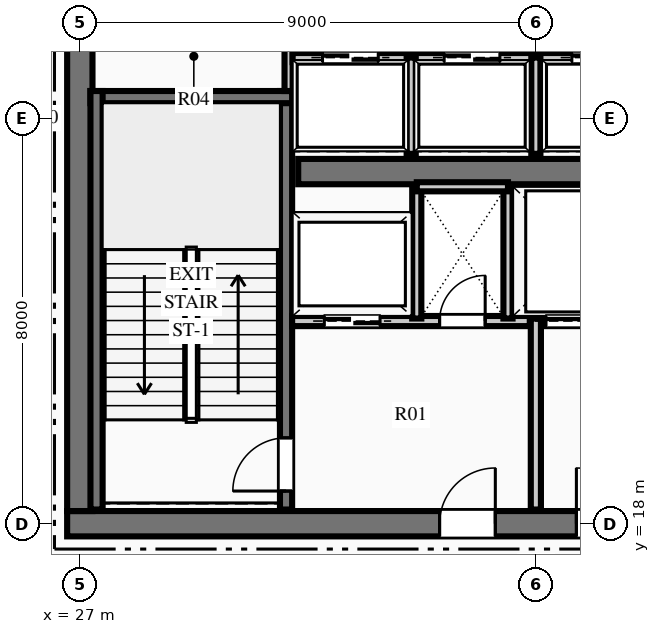
"""IFC4 building model, lengths in metres.
Left out: names, types, materials, properties, quantities, classifications, styles, units other than length and angle.
Written with IfcOpenShell. Run it as: python <this file> out.ifc"""

import sys

from ifc_helpers import new_model, si_unit, direction, frame, frame_2d, origin, place, context, subcontext, project, spatial, rectangle, extrude, element, fill, save


model = new_model("IFC4")
c1 = context("Model", 3, precision=1e-05, world=origin(), true_north=direction((0.0, 1.0)))
c2 = subcontext(c1, "Body", "Model", "MODEL_VIEW")
j1 = project(units=[si_unit("LENGTHUNIT", "METRE"), si_unit("PLANEANGLEUNIT", "RADIAN")], contexts=[c1])
p1 = place(None, origin())
s1 = spatial("IfcSite", under=j1, at=p1, CompositionType="ELEMENT")
p2 = place(p1, origin())
s2 = spatial("IfcBuilding", under=s1, at=p2, CompositionType="ELEMENT")
p3 = place(p2, frame((0.0, 0.0, 239.7)))
s3 = spatial("IfcBuildingStorey", under=s2, at=p3, CompositionType="ELEMENT", Elevation=239.7)
p4 = place(p3, frame((26.75, 18.0, 0.0), z_axis=(0.0, 0.0, 1.0), x_axis=(1.0, 0.0, 0.0)))
e1 = element("IfcWall", 1, at=p4, inside=s3, PredefinedType="SHEAR", context=c2, shape_type="SweptSolid", body=[
    extrude(rectangle(XDim=18.5, YDim=0.5, at=frame_2d((9.25, 0.0))), origin(), (0.0, 0.0, 1.0), 4.5),
])
p5 = place(p4, frame((7.35, 0.0, 0.0)))
e2 = element("IfcOpeningElement", 2, at=p5, cuts=e1, PredefinedType="OPENING", context=c2, shape_type="SweptSolid", body=[
    extrude(rectangle(XDim=1.1, YDim=2.15, at=frame_2d((0.55, 1.075))), frame((0.0, 0.26, 0.0), z_axis=(0.0, -1.0, 0.0), x_axis=(1.0, 0.0, 0.0)), (0.0, 0.0, 1.0), 0.52),
])
p6 = place(p4, frame((10.05, 0.0, 0.0)))
e3 = element("IfcOpeningElement", 3, at=p6, cuts=e1, PredefinedType="OPENING", context=c2, shape_type="SweptSolid", body=[
    extrude(rectangle(XDim=1.1, YDim=2.15, at=frame_2d((0.55, 1.075))), frame((0.0, 0.26, 0.0), z_axis=(0.0, -1.0, 0.0), x_axis=(1.0, 0.0, 0.0)), (0.0, 0.0, 1.0), 0.52),
])
p7 = place(p3, frame((27.0, 18.25, 0.0), z_axis=(0.0, 0.0, 1.0), x_axis=(0.0, 1.0, 0.0)))
e4 = element("IfcWall", 4, at=p7, inside=s3, PredefinedType="SHEAR", context=c2, shape_type="SweptSolid", body=[
    extrude(rectangle(XDim=15.5, YDim=0.5, at=frame_2d((7.75, 0.0))), origin(), (0.0, 0.0, 1.0), 4.5),
])
p8 = place(p7, frame((9.99, 0.0, 0.0)))
e5 = element("IfcOpeningElement", 5, at=p8, cuts=e4, PredefinedType="OPENING", context=c2, shape_type="SweptSolid", body=[
    extrude(rectangle(XDim=1.4, YDim=2.2, at=frame_2d((0.7, 1.1))), frame((0.0, 0.26, 0.0), z_axis=(0.0, -1.0, 0.0), x_axis=(1.0, 0.0, 0.0)), (0.0, 0.0, 1.0), 0.52),
])
p9 = place(p3, frame((31.31, 24.95, 0.0), z_axis=(0.0, 0.0, 1.0), x_axis=(1.0, 0.0, 0.0)))
e6 = element("IfcWall", 6, at=p9, inside=s3, PredefinedType="SHEAR", context=c2, shape_type="SweptSolid", body=[
    extrude(rectangle(XDim=9.38, YDim=0.5, at=frame_2d((4.69, 0.0))), origin(), (0.0, 0.0, 1.0), 4.5),
])
p10 = place(p3, frame((31.07, 18.28, 0.0), z_axis=(0.0, 0.0, 1.0), x_axis=(0.0, 1.0, 0.0)))
e7 = element("IfcWall", 7, at=p10, inside=s3, PredefinedType="SHEAR", context=c2, shape_type="SweptSolid", body=[
    extrude(rectangle(XDim=8.26, YDim=0.24, at=frame_2d((4.13, 0.0))), origin(), (0.0, 0.0, 1.0), 4.5),
])
p11 = place(p10, frame((0.365, 0.0, 0.0)))
e8 = element("IfcOpeningElement", 8, at=p11, cuts=e7, PredefinedType="OPENING", context=c2, shape_type="SweptSolid", body=[
    extrude(rectangle(XDim=1.05, YDim=2.15, at=frame_2d((0.525, 1.075))), frame((0.0, 0.13, 0.0), z_axis=(0.0, -1.0, 0.0), x_axis=(1.0, 0.0, 0.0)), (0.0, 0.0, 1.0), 0.26),
])
p12 = place(p3, frame((27.21, 26.42, 0.0), z_axis=(0.0, 0.0, 1.0), x_axis=(1.0, 0.0, 0.0)))
e9 = element("IfcWall", 9, at=p12, inside=s3, PredefinedType="SHEAR", context=c2, shape_type="SweptSolid", body=[
    extrude(rectangle(XDim=3.98, YDim=0.24, at=frame_2d((1.99, 0.0))), origin(), (0.0, 0.0, 1.0), 4.5),
])
p13 = place(p3, frame((27.33, 18.28, 0.0), z_axis=(0.0, 0.0, 1.0), x_axis=(0.0, 1.0, 0.0)))
e10 = element("IfcWall", 10, at=p13, inside=s3, PredefinedType="SHEAR", context=c2, shape_type="SweptSolid", body=[
    extrude(rectangle(XDim=8.26, YDim=0.24, at=frame_2d((4.13, 0.0))), origin(), (0.0, 0.0, 1.0), 4.5),
])
p14 = place(p3, frame((36.0, 18.28, 0.0), z_axis=(0.0, 0.0, 1.0), x_axis=(0.0, 1.0, 0.0)))
e11 = element("IfcWall", 11, at=p14, inside=s3, PredefinedType="PARTITIONING", context=c2, shape_type="SweptSolid", body=[
    extrude(rectangle(XDim=3.77, YDim=0.2, at=frame_2d((1.885, 0.0))), origin(), (0.0, 0.0, 1.0), 4.1),
])
p15 = place(p3, frame((31.19, 22.0, 0.0), z_axis=(0.0, 0.0, 1.0), x_axis=(1.0, 0.0, 0.0)))
e12 = element("IfcWall", 12, at=p15, inside=s3, PredefinedType="PARTITIONING", context=c2, shape_type="SweptSolid", body=[
    extrude(rectangle(XDim=4.69, YDim=0.2, at=frame_2d((2.345, 0.0))), origin(), (0.0, 0.0, 1.0), 4.1),
])
p16 = place(p15, frame((2.91, 0.0, 0.0)))
e13 = element("IfcOpeningElement", 13, at=p16, cuts=e12, PredefinedType="OPENING", context=c2, shape_type="SweptSolid", body=[
    extrude(rectangle(XDim=0.9, YDim=2.15, at=frame_2d((0.45, 1.075))), frame((0.0, 0.11, 0.0), z_axis=(0.0, -1.0, 0.0), x_axis=(1.0, 0.0, 0.0)), (0.0, 0.0, 1.0), 0.22),
])
p17 = place(p15, frame((0.635, 0.0, 0.0)))
e14 = element("IfcOpeningElement", 14, at=p17, cuts=e12, PredefinedType="OPENING", context=c2, shape_type="SweptSolid", body=[
    extrude(rectangle(XDim=1.1, YDim=2.15, at=frame_2d((0.55, 1.075))), frame((0.0, 0.11, 0.0), z_axis=(0.0, -1.0, 0.0), x_axis=(1.0, 0.0, 0.0)), (0.0, 0.0, 1.0), 0.22),
])
p18 = place(p3, frame((36.12, 22.0, 0.0), z_axis=(0.0, 0.0, 1.0), x_axis=(1.0, 0.0, 0.0)))
e15 = element("IfcWall", 15, at=p18, inside=s3, PredefinedType="PARTITIONING", context=c2, shape_type="SweptSolid", body=[
    extrude(rectangle(XDim=4.69, YDim=0.2, at=frame_2d((2.345, 0.0))), origin(), (0.0, 0.0, 1.0), 4.1),
])
p19 = place(p18, frame((2.955, 0.0, 0.0)))
e16 = element("IfcOpeningElement", 16, at=p19, cuts=e15, PredefinedType="OPENING", context=c2, shape_type="SweptSolid", body=[
    extrude(rectangle(XDim=1.1, YDim=2.15, at=frame_2d((0.55, 1.075))), frame((0.0, 0.11, 0.0), z_axis=(0.0, -1.0, 0.0), x_axis=(1.0, 0.0, 0.0)), (0.0, 0.0, 1.0), 0.22),
])
p20 = place(p18, frame((0.08, 0.0, 0.0)))
e17 = element("IfcOpeningElement", 17, at=p20, cuts=e15, PredefinedType="OPENING", context=c2, shape_type="SweptSolid", body=[
    extrude(rectangle(XDim=1.4, YDim=2.2, at=frame_2d((0.7, 1.1))), frame((0.0, 0.11, 0.0), z_axis=(0.0, -1.0, 0.0), x_axis=(1.0, 0.0, 0.0)), (0.0, 0.0, 1.0), 0.22),
])
for number, where, z_axis, x_axis in (
    (18, (33.65, 22.05, 0.0), (0.0, 0.0, 1.0), (0.0, 1.0, 0.0)),
    (19, (35.45, 22.05, 0.0), (0.0, 0.0, 1.0), (0.0, 1.0, 0.0)),
):
    element("IfcWall", number, at=place(p3, frame(where, z_axis=z_axis, x_axis=x_axis)), inside=s3, PredefinedType="PARTITIONING", context=c2, shape_type="SweptSolid", body=[
        extrude(rectangle(XDim=2.6, YDim=0.18, at=frame_2d((1.3, 0.0))), origin(), (0.0, 0.0, 1.0), 4.1),
    ])
p21 = place(p3, frame((33.65, 24.65, 0.0), z_axis=(0.0, 0.0, 1.0), x_axis=(1.0, 0.0, 0.0)))
e20 = element("IfcWall", 20, at=p21, inside=s3, PredefinedType="PARTITIONING", context=c2, shape_type="SweptSolid", body=[
    extrude(rectangle(XDim=1.8, YDim=0.18, at=frame_2d((0.9, 0.0))), origin(), (0.0, 0.0, 1.0), 4.1),
])
p22 = place(p3, frame((31.12, 26.54, 0.0), z_axis=(0.0, 0.0, 1.0), x_axis=(0.0, 1.0, 0.0)))
e21 = element("IfcWall", 21, at=p22, inside=s3, PredefinedType="PARTITIONING", context=c2, shape_type="SweptSolid", body=[
    extrude(rectangle(XDim=1.51, YDim=0.16, at=frame_2d((0.755, 0.0))), origin(), (0.0, 0.0, 1.0), 4.1),
])
p23 = place(p3, frame((31.2, 27.2, 0.0), z_axis=(0.0, 0.0, 1.0), x_axis=(1.0, 0.0, 0.0)))
e22 = element("IfcWall", 22, at=p23, inside=s3, PredefinedType="PARTITIONING", context=c2, shape_type="SweptSolid", body=[
    extrude(rectangle(XDim=9.6, YDim=0.18, at=frame_2d((4.8, 0.0))), origin(), (0.0, 0.0, 1.0), 4.1),
])
p24 = place(p23, frame((0.59, 0.0, 0.0)))
e23 = element("IfcOpeningElement", 23, at=p24, cuts=e22, PredefinedType="OPENING", context=c2, shape_type="SweptSolid", body=[
    extrude(rectangle(XDim=1.1, YDim=2.15, at=frame_2d((0.55, 1.075))), frame((0.0, 0.1, 0.0), z_axis=(0.0, -1.0, 0.0), x_axis=(1.0, 0.0, 0.0)), (0.0, 0.0, 1.0), 0.2),
])
p25 = place(p23, frame((2.99, 0.0, 0.0)))
e24 = element("IfcOpeningElement", 24, at=p25, cuts=e22, PredefinedType="OPENING", context=c2, shape_type="SweptSolid", body=[
    extrude(rectangle(XDim=1.1, YDim=2.15, at=frame_2d((0.55, 1.075))), frame((0.0, 0.1, 0.0), z_axis=(0.0, -1.0, 0.0), x_axis=(1.0, 0.0, 0.0)), (0.0, 0.0, 1.0), 0.2),
])
p26 = place(p23, frame((5.51, 0.0, 0.0)))
e25 = element("IfcOpeningElement", 25, at=p26, cuts=e22, PredefinedType="OPENING", context=c2, shape_type="SweptSolid", body=[
    extrude(rectangle(XDim=1.1, YDim=2.15, at=frame_2d((0.55, 1.075))), frame((0.0, 0.1, 0.0), z_axis=(0.0, -1.0, 0.0), x_axis=(1.0, 0.0, 0.0)), (0.0, 0.0, 1.0), 0.2),
])
p27 = place(p23, frame((7.91, 0.0, 0.0)))
e26 = element("IfcOpeningElement", 26, at=p27, cuts=e22, PredefinedType="OPENING", context=c2, shape_type="SweptSolid", body=[
    extrude(rectangle(XDim=1.1, YDim=2.15, at=frame_2d((0.55, 1.075))), frame((0.0, 0.1, 0.0), z_axis=(0.0, -1.0, 0.0), x_axis=(1.0, 0.0, 0.0)), (0.0, 0.0, 1.0), 0.2),
])
for number, where, z_axis, x_axis in (
    (27, (33.54, 25.3, 0.0), (0.0, 0.0, 1.0), (0.0, 1.0, 0.0)),
    (28, (36.0, 25.3, 0.0), (0.0, 0.0, 1.0), (0.0, 1.0, 0.0)),
):
    element("IfcWall", number, at=place(p3, frame(where, z_axis=z_axis, x_axis=x_axis)), inside=s3, PredefinedType="PARTITIONING", context=c2, shape_type="SweptSolid", body=[
        extrude(rectangle(XDim=1.9, YDim=0.18, at=frame_2d((0.95, 0.0))), origin(), (0.0, 0.0, 1.0), 4.1),
    ])
p28 = place(p11, origin())
e29 = element("IfcDoor", 29, at=p28, inside=s3, OperationType="SINGLE_SWING_LEFT", PredefinedType="DOOR", context=c2, shape_type="SweptSolid", body=[
    extrude(rectangle(XDim=1.05, YDim=2.15, at=frame_2d((0.525, 1.075))), frame((0.0, 0.025, 0.0), z_axis=(0.0, -1.0, 0.0), x_axis=(1.0, 0.0, 0.0)), (0.0, 0.0, 1.0), 0.05),
])
fill(e8, e29)
p29 = place(p5, origin())
e30 = element("IfcDoor", 30, at=p29, inside=s3, OperationType="SINGLE_SWING_RIGHT", PredefinedType="DOOR", context=c2, shape_type="SweptSolid", body=[
    extrude(rectangle(XDim=1.1, YDim=2.15, at=frame_2d((0.55, 1.075))), frame((0.0, 0.025, 0.0), z_axis=(0.0, -1.0, 0.0), x_axis=(1.0, 0.0, 0.0)), (0.0, 0.0, 1.0), 0.05),
])
fill(e2, e30)
p30 = place(p6, origin())
e31 = element("IfcDoor", 31, at=p30, inside=s3, OperationType="SINGLE_SWING_LEFT", PredefinedType="DOOR", context=c2, shape_type="SweptSolid", body=[
    extrude(rectangle(XDim=1.1, YDim=2.15, at=frame_2d((0.55, 1.075))), frame((0.0, 0.025, 0.0), z_axis=(0.0, -1.0, 0.0), x_axis=(1.0, 0.0, 0.0)), (0.0, 0.0, 1.0), 0.05),
])
fill(e3, e31)
p31 = place(p16, origin())
e32 = element("IfcDoor", 32, at=p31, inside=s3, OperationType="SINGLE_SWING_RIGHT", PredefinedType="DOOR", context=c2, shape_type="SweptSolid", body=[
    extrude(rectangle(XDim=0.9, YDim=2.15, at=frame_2d((0.45, 1.075))), frame((0.0, 0.025, 0.0), z_axis=(0.0, -1.0, 0.0), x_axis=(1.0, 0.0, 0.0)), (0.0, 0.0, 1.0), 0.05),
])
fill(e13, e32)
p32 = place(p24, origin())
e33 = element("IfcDoor", 33, at=p32, inside=s3, OperationType="SLIDING_TO_LEFT", PredefinedType="DOOR", context=c2, shape_type="SweptSolid", body=[
    extrude(rectangle(XDim=1.1, YDim=2.15, at=frame_2d((0.55, 1.075))), frame((0.0, 0.025, 0.0), z_axis=(0.0, -1.0, 0.0), x_axis=(1.0, 0.0, 0.0)), (0.0, 0.0, 1.0), 0.05),
])
fill(e23, e33)
p33 = place(p25, origin())
e34 = element("IfcDoor", 34, at=p33, inside=s3, OperationType="SLIDING_TO_LEFT", PredefinedType="DOOR", context=c2, shape_type="SweptSolid", body=[
    extrude(rectangle(XDim=1.1, YDim=2.15, at=frame_2d((0.55, 1.075))), frame((0.0, 0.025, 0.0), z_axis=(0.0, -1.0, 0.0), x_axis=(1.0, 0.0, 0.0)), (0.0, 0.0, 1.0), 0.05),
])
fill(e24, e34)
p34 = place(p26, origin())
e35 = element("IfcDoor", 35, at=p34, inside=s3, OperationType="SLIDING_TO_LEFT", PredefinedType="DOOR", context=c2, shape_type="SweptSolid", body=[
    extrude(rectangle(XDim=1.1, YDim=2.15, at=frame_2d((0.55, 1.075))), frame((0.0, 0.025, 0.0), z_axis=(0.0, -1.0, 0.0), x_axis=(1.0, 0.0, 0.0)), (0.0, 0.0, 1.0), 0.05),
])
fill(e25, e35)
p35 = place(p17, origin())
e36 = element("IfcDoor", 36, at=p35, inside=s3, OperationType="SLIDING_TO_LEFT", PredefinedType="DOOR", context=c2, shape_type="SweptSolid", body=[
    extrude(rectangle(XDim=1.1, YDim=2.15, at=frame_2d((0.55, 1.075))), frame((0.0, 0.025, 0.0), z_axis=(0.0, -1.0, 0.0), x_axis=(1.0, 0.0, 0.0)), (0.0, 0.0, 1.0), 0.05),
])
fill(e14, e36)
p36 = place(p20, origin())
e37 = element("IfcDoor", 37, at=p36, inside=s3, OperationType="SLIDING_TO_LEFT", PredefinedType="DOOR", context=c2, shape_type="SweptSolid", body=[
    extrude(rectangle(XDim=1.4, YDim=2.2, at=frame_2d((0.7, 1.1))), frame((0.0, 0.025, 0.0), z_axis=(0.0, -1.0, 0.0), x_axis=(1.0, 0.0, 0.0)), (0.0, 0.0, 1.0), 0.05),
])
fill(e17, e37)
save(model, sys.argv[1])
